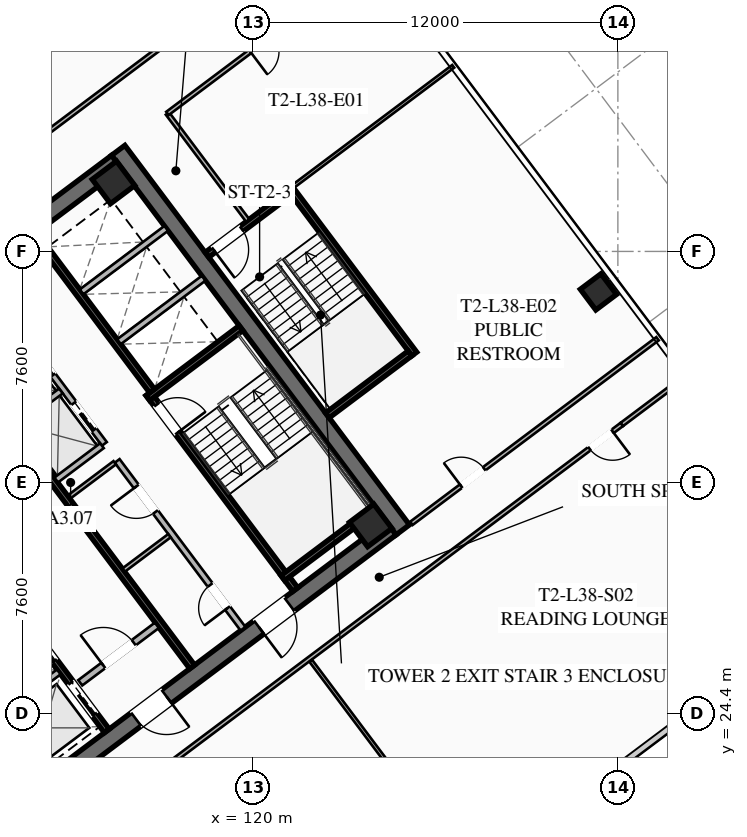
"""IFC4 building model, lengths in metres.
Left out: names, types, materials, properties, quantities, classifications, styles, units other than length and angle.
Written with IfcOpenShell. Run it as: python <this file> out.ifc"""

import sys

from ifc_helpers import new_model, si_unit, direction, frame, frame_2d, origin, origin_2d, place, context, subcontext, project, spatial, rectangle, hollow_rectangle, extrude, element, fill, save


model = new_model("IFC4")
c1 = context("Model", 3, precision=1e-05, world=origin(), true_north=direction((0.0, 1.0)))
c2 = subcontext(c1, "Body", "Model", "MODEL_VIEW")
j1 = project(units=[si_unit("LENGTHUNIT", "METRE"), si_unit("PLANEANGLEUNIT", "RADIAN")], contexts=[c1])
p1 = place(None, origin())
s1 = spatial("IfcSite", under=j1, at=p1, CompositionType="ELEMENT")
p2 = place(p1, origin())
s2 = spatial("IfcBuilding", under=s1, at=p2, CompositionType="ELEMENT")
p3 = place(p2, frame((0.0, 0.0, 142.8)))
s3 = spatial("IfcBuildingStorey", under=s2, at=p3, CompositionType="ELEMENT", Elevation=142.8)
p4 = place(p3, frame((115.564, 42.923, 0.0), z_axis=(0.0, 0.0, 1.0), x_axis=(0.600005007985, -0.799996243986, 0.0)))
e1 = element("IfcWall", 1, at=p4, inside=s3, PredefinedType="SHEAR", context=c2, shape_type="SweptSolid", body=[
    extrude(rectangle(XDim=15.6, YDim=0.55, at=frame_2d((7.8, 0.0))), origin(), (0.0, 0.0, 1.0), 3.55),
])
p5 = place(p3, frame((124.539, 30.498, 0.0), z_axis=(0.0, 0.0, 1.0), x_axis=(-0.799998054672, -0.600002593761, 0.0)))
e2 = element("IfcWall", 2, at=p5, inside=s3, PredefinedType="SHEAR", context=c2, shape_type="SweptSolid", body=[
    extrude(rectangle(XDim=15.06, YDim=0.55, at=frame_2d((7.53, 0.0))), origin(), (0.0, 0.0, 1.0), 3.55),
])
p6 = place(p5, frame((9.23, 0.0, 0.0)))
e3 = element("IfcOpeningElement", 3, at=p6, cuts=e2, PredefinedType="OPENING", context=c2, shape_type="SweptSolid", body=[
    extrude(rectangle(XDim=1.25, YDim=2.25, at=frame_2d((0.625, 1.125))), frame((0.0, 0.285, 0.0), z_axis=(0.0, -1.0, 0.0), x_axis=(1.0, 0.0, 0.0)), (0.0, 0.0, 1.0), 0.57),
])
p7 = place(p5, frame((4.18, 0.0, 0.0)))
e4 = element("IfcOpeningElement", 4, at=p7, cuts=e2, PredefinedType="OPENING", context=c2, shape_type="SweptSolid", body=[
    extrude(rectangle(XDim=1.25, YDim=2.25, at=frame_2d((0.625, 1.125))), frame((0.0, 0.285, 0.0), z_axis=(0.0, -1.0, 0.0), x_axis=(1.0, 0.0, 0.0)), (0.0, 0.0, 1.0), 0.57),
])
p8 = place(p3, frame((103.461, 33.502, 0.0), z_axis=(0.0, 0.0, 1.0), x_axis=(0.799998054672, 0.600002593761, 0.0)))
e5 = element("IfcWall", 5, at=p8, inside=s3, PredefinedType="SHEAR", context=c2, shape_type="SweptSolid", body=[
    extrude(rectangle(XDim=15.06, YDim=0.55, at=frame_2d((7.53, 0.0))), origin(), (0.0, 0.0, 1.0), 3.55),
])
p9 = place(p8, frame((4.58, 0.0, 0.0)))
e6 = element("IfcOpeningElement", 6, at=p9, cuts=e5, PredefinedType="OPENING", context=c2, shape_type="SweptSolid", body=[
    extrude(rectangle(XDim=1.25, YDim=2.25, at=frame_2d((0.625, 1.125))), frame((0.0, 0.285, 0.0), z_axis=(0.0, -1.0, 0.0), x_axis=(1.0, 0.0, 0.0)), (0.0, 0.0, 1.0), 0.57),
])
p10 = place(p8, frame((9.63, 0.0, 0.0)))
e7 = element("IfcOpeningElement", 7, at=p10, cuts=e5, PredefinedType="OPENING", context=c2, shape_type="SweptSolid", body=[
    extrude(rectangle(XDim=1.25, YDim=2.25, at=frame_2d((0.625, 1.125))), frame((0.0, 0.285, 0.0), z_axis=(0.0, -1.0, 0.0), x_axis=(1.0, 0.0, 0.0)), (0.0, 0.0, 1.0), 0.57),
])
for number, where, z_axis, x_axis in (
    (8, (123.87, 30.59, 0.0), (0.0, 0.0, 1.0), (0.8, 0.6, 0.0)),
    (9, (115.41, 41.87, 0.0), (0.0, 0.0, 1.0), (0.8, 0.6, 0.0)),
):
    element("IfcColumn", number, at=place(p3, frame(where, z_axis=z_axis, x_axis=x_axis)), inside=s3, PredefinedType="COLUMN", context=c2, shape_type="SweptSolid", body=[
        extrude(hollow_rectangle(XDim=1.0, YDim=1.0, WallThickness=0.04, at=origin_2d()), origin(), (0.0, 0.0, 1.0), 3.37),
    ])
p11 = place(p3, frame((131.36, 38.27, 0.0), z_axis=(0.0, 0.0, 1.0), x_axis=(0.799999996291, 0.600000004945, 0.0)))
e10 = element("IfcColumn", 10, at=p11, inside=s3, PredefinedType="COLUMN", context=c2, shape_type="SweptSolid", body=[
    extrude(hollow_rectangle(XDim=0.85, YDim=0.85, WallThickness=0.035, at=origin_2d()), origin(), (0.0, 0.0, 1.0), 3.37),
])
p12 = place(p3, frame((116.56, 34.92, 0.0), z_axis=(0.0, 0.0, 1.0), x_axis=(0.59999029481, -0.8000072788, 0.0)))
e11 = element("IfcWall", 11, at=p12, inside=s3, PredefinedType="SHEAR", context=c2, shape_type="SweptSolid", body=[
    extrude(rectangle(XDim=8.05, YDim=0.2, at=frame_2d((4.025, 0.0))), origin(), (0.0, 0.0, 1.0), 3.37),
])
p13 = place(p12, frame((0.45, 0.0, 0.0)))
e12 = element("IfcOpeningElement", 12, at=p13, cuts=e11, PredefinedType="OPENING", context=c2, shape_type="SweptSolid", body=[
    extrude(rectangle(XDim=1.15, YDim=2.2, at=frame_2d((0.575, 1.1))), frame((0.0, 0.11, 0.0), z_axis=(0.0, -1.0, 0.0), x_axis=(1.0, 0.0, 0.0)), (0.0, 0.0, 1.0), 0.22),
])
for number, where, z_axis, x_axis in (
    (13, (116.54, 34.78, 0.0), (0.0, 0.0, 1.0), (0.8, 0.6, 0.0)),
    (14, (120.98, 28.86, 0.0), (0.0, 0.0, 1.0), (0.8, 0.6, 0.0)),
):
    element("IfcWall", number, at=place(p3, frame(where, z_axis=z_axis, x_axis=x_axis)), inside=s3, PredefinedType="SHEAR", context=c2, shape_type="SweptSolid", body=[
        extrude(rectangle(XDim=3.83, YDim=0.2, at=frame_2d((1.915, 0.0))), origin(), (0.0, 0.0, 1.0), 3.37),
    ])
p14 = place(p3, frame((117.998, 25.936, 0.0), z_axis=(0.0, 0.0, 1.0), x_axis=(-0.600002693989, 0.799997979501, 0.0)))
e15 = element("IfcWall", 15, at=p14, inside=s3, PredefinedType="SHEAR", context=c2, shape_type="SweptSolid", body=[
    extrude(rectangle(XDim=14.5, YDim=0.2, at=frame_2d((7.25, 0.0))), origin(), (0.0, 0.0, 1.0), 3.37),
])
p15 = place(p3, frame((114.316, 25.412, 0.0), z_axis=(0.0, 0.0, 1.0), x_axis=(0.800018601094, 0.59997519774, 0.0)))
e16 = element("IfcWall", 16, at=p15, inside=s3, PredefinedType="SOLIDWALL", context=c2, shape_type="SweptSolid", body=[
    extrude(rectangle(XDim=3.15, YDim=0.22, at=frame_2d((1.575, 0.0))), origin(), (0.0, 0.0, 1.0), 2.723),
])
p16 = place(p15, frame((0.95, 0.0, 0.0)))
e17 = element("IfcOpeningElement", 17, at=p16, cuts=e16, PredefinedType="OPENING", context=c2, shape_type="SweptSolid", body=[
    extrude(rectangle(XDim=1.25, YDim=2.25, at=frame_2d((0.625, 1.125))), frame((0.0, 0.12, 0.0), z_axis=(0.0, -1.0, 0.0), x_axis=(1.0, 0.0, 0.0)), (0.0, 0.0, 1.0), 0.24),
])
p17 = place(p3, frame((115.19, 23.83, 0.0), z_axis=(0.0, 0.0, 1.0), x_axis=(-0.599993943644, 0.800004542231, 0.0)))
e18 = element("IfcWall", 18, at=p17, inside=s3, PredefinedType="SHEAR", context=c2, shape_type="SweptSolid", body=[
    extrude(rectangle(XDim=6.45, YDim=0.2, at=frame_2d((3.225, 0.0))), origin(), (0.0, 0.0, 1.0), 3.37),
])
p18 = place(p17, frame((4.875, 0.0, 0.0)))
e19 = element("IfcOpeningElement", 19, at=p18, cuts=e18, PredefinedType="OPENING", context=c2, shape_type="SweptSolid", body=[
    extrude(rectangle(XDim=1.3, YDim=2.25, at=frame_2d((0.65, 1.125))), frame((0.0, 0.11, 0.0), z_axis=(0.0, -1.0, 0.0), x_axis=(1.0, 0.0, 0.0)), (0.0, 0.0, 1.0), 0.22),
])
p19 = place(p17, frame((2.875, 0.0, 0.0)))
e20 = element("IfcOpeningElement", 20, at=p19, cuts=e18, PredefinedType="OPENING", context=c2, shape_type="SweptSolid", body=[
    extrude(rectangle(XDim=1.3, YDim=2.25, at=frame_2d((0.65, 1.125))), frame((0.0, 0.11, 0.0), z_axis=(0.0, -1.0, 0.0), x_axis=(1.0, 0.0, 0.0)), (0.0, 0.0, 1.0), 0.22),
])
p20 = place(p17, frame((0.675, 0.0, 0.0)))
e21 = element("IfcOpeningElement", 21, at=p20, cuts=e18, PredefinedType="OPENING", context=c2, shape_type="SweptSolid", body=[
    extrude(rectangle(XDim=1.3, YDim=2.25, at=frame_2d((0.65, 1.125))), frame((0.0, 0.11, 0.0), z_axis=(0.0, -1.0, 0.0), x_axis=(1.0, 0.0, 0.0)), (0.0, 0.0, 1.0), 0.22),
])
p21 = place(p3, frame((110.826, 23.682, 0.0), z_axis=(0.0, 0.0, 1.0), x_axis=(0.8, 0.6, 0.0)))
e22 = element("IfcWall", 22, at=p21, inside=s3, PredefinedType="SOLIDWALL", context=c2, shape_type="SweptSolid", body=[
    extrude(rectangle(XDim=3.48, YDim=0.2, at=frame_2d((1.74, 0.0))), origin(), (0.0, 0.0, 1.0), 3.37),
])
p22 = place(p3, frame((112.81, 40.17, 0.0), z_axis=(0.0, 0.0, 1.0), x_axis=(0.599993943644, -0.800004542231, 0.0)))
e23 = element("IfcWall", 23, at=p22, inside=s3, PredefinedType="SHEAR", context=c2, shape_type="SweptSolid", body=[
    extrude(rectangle(XDim=6.45, YDim=0.2, at=frame_2d((3.225, 0.0))), origin(), (0.0, 0.0, 1.0), 3.37),
])
for number, where, z_axis, x_axis in (
    (24, (115.59, 36.63, 0.0), (0.0, 0.0, 1.0), (0.8, 0.6, 0.0)),
    (25, (114.36, 38.27, 0.0), (0.0, 0.0, 1.0), (0.8, 0.6, 0.0)),
):
    element("IfcWall", number, at=place(p3, frame(where, z_axis=z_axis, x_axis=x_axis)), inside=s3, PredefinedType="SOLIDWALL", context=c2, shape_type="SweptSolid", body=[
        extrude(rectangle(XDim=3.48, YDim=0.2, at=frame_2d((1.74, 0.0))), origin(), (0.0, 0.0, 1.0), 3.37),
    ])
p23 = place(p3, frame((119.67, 27.19, 0.0), z_axis=(0.0, 0.0, 1.0), x_axis=(-0.599988677396, 0.800008491828, 0.0)))
e26 = element("IfcWall", 26, at=p23, inside=s3, PredefinedType="SOLIDWALL", context=c2, shape_type="SweptSolid", body=[
    extrude(rectangle(XDim=6.9, YDim=0.2, at=frame_2d((3.45, 0.0))), origin(), (0.0, 0.0, 1.0), 2.723),
])
p24 = place(p23, frame((0.85, 0.0, 0.0)))
e27 = element("IfcOpeningElement", 27, at=p24, cuts=e26, PredefinedType="OPENING", context=c2, shape_type="SweptSolid", body=[
    extrude(rectangle(XDim=0.95, YDim=2.05, at=frame_2d((0.475, 1.025))), frame((0.0, 0.11, 0.0), z_axis=(0.0, -1.0, 0.0), x_axis=(1.0, 0.0, 0.0)), (0.0, 0.0, 1.0), 0.22),
])
p25 = place(p23, frame((4.8, 0.0, 0.0)))
e28 = element("IfcOpeningElement", 28, at=p25, cuts=e26, PredefinedType="OPENING", context=c2, shape_type="SweptSolid", body=[
    extrude(rectangle(XDim=1.05, YDim=2.2, at=frame_2d((0.525, 1.1))), frame((0.0, 0.11, 0.0), z_axis=(0.0, -1.0, 0.0), x_axis=(1.0, 0.0, 0.0)), (0.0, 0.0, 1.0), 0.22),
])
for number, where, z_axis, x_axis in (
    (29, (113.946, 31.522, 0.0), (0.0, 0.0, 1.0), (0.8, 0.6, 0.0)),
    (30, (115.746, 29.122, 0.0), (0.0, 0.0, 1.0), (0.8, 0.6, 0.0)),
):
    element("IfcWall", number, at=place(p3, frame(where, z_axis=z_axis, x_axis=x_axis)), inside=s3, PredefinedType="PARTITIONING", context=c2, shape_type="SweptSolid", body=[
        extrude(rectangle(XDim=1.88, YDim=0.135, at=frame_2d((0.94, 0.0))), origin(), (0.0, 0.0, 1.0), 2.723),
    ])
p26 = place(p3, frame((115.11, 33.27, 0.0), z_axis=(0.0, 0.0, 1.0), x_axis=(-0.600011322243, 0.799991508192, 0.0)))
e31 = element("IfcWall", 31, at=p26, inside=s3, PredefinedType="SOLIDWALL", context=c2, shape_type="SweptSolid", body=[
    extrude(rectangle(XDim=6.9, YDim=0.2, at=frame_2d((3.45, 0.0))), origin(), (0.0, 0.0, 1.0), 3.37),
])
p27 = place(p26, frame((0.575, 0.0, 0.0)))
e32 = element("IfcOpeningElement", 32, at=p27, cuts=e31, PredefinedType="OPENING", context=c2, shape_type="SweptSolid", body=[
    extrude(rectangle(XDim=1.1, YDim=2.2, at=frame_2d((0.55, 1.1))), frame((0.0, 0.11, 0.0), z_axis=(0.0, -1.0, 0.0), x_axis=(1.0, 0.0, 0.0)), (0.0, 0.0, 1.0), 0.22),
])
p28 = place(p26, frame((2.825, 0.0, 0.0)))
e33 = element("IfcOpeningElement", 33, at=p28, cuts=e31, PredefinedType="OPENING", context=c2, shape_type="SweptSolid", body=[
    extrude(rectangle(XDim=1.1, YDim=2.2, at=frame_2d((0.55, 1.1))), frame((0.0, 0.11, 0.0), z_axis=(0.0, -1.0, 0.0), x_axis=(1.0, 0.0, 0.0)), (0.0, 0.0, 1.0), 0.22),
])
p29 = place(p26, frame((5.075, 0.0, 0.0)))
e34 = element("IfcOpeningElement", 34, at=p29, cuts=e31, PredefinedType="OPENING", context=c2, shape_type="SweptSolid", body=[
    extrude(rectangle(XDim=1.1, YDim=2.2, at=frame_2d((0.55, 1.1))), frame((0.0, 0.11, 0.0), z_axis=(0.0, -1.0, 0.0), x_axis=(1.0, 0.0, 0.0)), (0.0, 0.0, 1.0), 0.22),
])
p30 = place(p3, frame((113.526, 32.082, 0.0), z_axis=(0.0, 0.0, 1.0), x_axis=(0.800046745961, 0.599937666993, 0.0)))
e35 = element("IfcWall", 35, at=p30, inside=s3, PredefinedType="SOLIDWALL", context=c2, shape_type="SweptSolid", body=[
    extrude(rectangle(XDim=1.88, YDim=0.2, at=frame_2d((0.94, 0.0))), origin(), (0.0, 0.0, 1.0), 3.37),
])
p31 = place(p3, frame((112.176, 33.882, 0.0), z_axis=(0.0, 0.0, 1.0), x_axis=(0.8, 0.6, 0.0)))
e36 = element("IfcWall", 36, at=p31, inside=s3, PredefinedType="SOLIDWALL", context=c2, shape_type="SweptSolid", body=[
    extrude(rectangle(XDim=1.88, YDim=0.2, at=frame_2d((0.94, 0.0))), origin(), (0.0, 0.0, 1.0), 3.37),
])
p32 = place(p3, frame((125.304, 36.228, 0.0), z_axis=(0.0, 0.0, 1.0), x_axis=(-0.59998851072, 0.800008616831, 0.0)))
e37 = element("IfcWall", 37, at=p32, inside=s3, PredefinedType="SHEAR", context=c2, shape_type="SweptSolid", body=[
    extrude(rectangle(XDim=6.8, YDim=0.2, at=frame_2d((3.4, 0.0))), origin(), (0.0, 0.0, 1.0), 3.37),
])
p33 = place(p3, frame((121.204, 41.528, 0.0), z_axis=(0.0, 0.0, 1.0), x_axis=(-0.800017232136, -0.599977023131, 0.0)))
e38 = element("IfcWall", 38, at=p33, inside=s3, PredefinedType="SHEAR", context=c2, shape_type="SweptSolid", body=[
    extrude(rectangle(XDim=3.4, YDim=0.2, at=frame_2d((1.7, 0.0))), origin(), (0.0, 0.0, 1.0), 3.37),
])
p34 = place(p33, frame((1.975, 0.0, 0.0)))
e39 = element("IfcOpeningElement", 39, at=p34, cuts=e38, PredefinedType="OPENING", context=c2, shape_type="SweptSolid", body=[
    extrude(rectangle(XDim=1.15, YDim=2.2, at=frame_2d((0.575, 1.1))), frame((0.0, 0.11, 0.0), z_axis=(0.0, -1.0, 0.0), x_axis=(1.0, 0.0, 0.0)), (0.0, 0.0, 1.0), 0.22),
])
p35 = place(p3, frame((122.444, 34.208, 0.0), z_axis=(0.0, 0.0, 1.0), x_axis=(0.79999138319, 0.600011488909, 0.0)))
e40 = element("IfcWall", 40, at=p35, inside=s3, PredefinedType="SHEAR", context=c2, shape_type="SweptSolid", body=[
    extrude(rectangle(XDim=3.4, YDim=0.2, at=frame_2d((1.7, 0.0))), origin(), (0.0, 0.0, 1.0), 3.37),
])
p36 = place(p3, frame((119.824, 40.618, 0.0), z_axis=(0.0, 0.0, 1.0), x_axis=(-0.599982243973, 0.800013316712, 0.0)))
e41 = element("IfcWall", 41, at=p36, inside=s3, PredefinedType="PARTITIONING", context=c2, shape_type="SweptSolid", body=[
    extrude(rectangle(XDim=4.4, YDim=0.135, at=frame_2d((2.2, 0.0))), origin(), (0.0, 0.0, 1.0), 2.723),
])
p37 = place(p3, frame((95.678, 30.346, 0.0), z_axis=(0.0, 0.0, 1.0), x_axis=(0.8, 0.6, 0.0)))
e42 = element("IfcWall", 42, at=p37, inside=s3, PredefinedType="PARTITIONING", context=c2, shape_type="SweptSolid", body=[
    extrude(rectangle(XDim=31.3, YDim=0.135, at=frame_2d((15.65, 0.0))), origin(), (0.0, 0.0, 1.0), 2.723),
])
p38 = place(p37, frame((0.3, 0.0, 0.0)))
e43 = element("IfcOpeningElement", 43, at=p38, cuts=e42, PredefinedType="OPENING", context=c2, shape_type="SweptSolid", body=[
    extrude(rectangle(XDim=0.95, YDim=2.05, at=frame_2d((0.475, 1.025))), frame((0.0, 0.077, 0.0), z_axis=(0.0, -1.0, 0.0), x_axis=(1.0, 0.0, 0.0)), (0.0, 0.0, 1.0), 0.155),
])
p39 = place(p37, frame((30.05, 0.0, 0.0)))
e44 = element("IfcOpeningElement", 44, at=p39, cuts=e42, PredefinedType="OPENING", context=c2, shape_type="SweptSolid", body=[
    extrude(rectangle(XDim=0.95, YDim=2.05, at=frame_2d((0.475, 1.025))), frame((0.0, 0.077, 0.0), z_axis=(0.0, -1.0, 0.0), x_axis=(1.0, 0.0, 0.0)), (0.0, 0.0, 1.0), 0.155),
])
p40 = place(p3, frame((132.13, 33.91, 0.0), z_axis=(0.0, 0.0, 1.0), x_axis=(-0.799997191971, -0.600003744021, 0.0)))
e45 = element("IfcWall", 45, at=p40, inside=s3, PredefinedType="PARTITIONING", context=c2, shape_type="SweptSolid", body=[
    extrude(rectangle(XDim=31.3, YDim=0.135, at=frame_2d((15.65, 0.0))), origin(), (0.0, 0.0, 1.0), 2.723),
])
p41 = place(p40, frame((29.97, 0.0, 0.0)))
e46 = element("IfcOpeningElement", 46, at=p41, cuts=e45, PredefinedType="OPENING", context=c2, shape_type="SweptSolid", body=[
    extrude(rectangle(XDim=0.95, YDim=2.05, at=frame_2d((0.475, 1.025))), frame((0.0, 0.077, 0.0), z_axis=(0.0, -1.0, 0.0), x_axis=(1.0, 0.0, 0.0)), (0.0, 0.0, 1.0), 0.155),
])
p42 = place(p40, frame((0.38, 0.0, 0.0)))
e47 = element("IfcOpeningElement", 47, at=p42, cuts=e45, PredefinedType="OPENING", context=c2, shape_type="SweptSolid", body=[
    extrude(rectangle(XDim=0.95, YDim=2.05, at=frame_2d((0.475, 1.025))), frame((0.0, 0.077, 0.0), z_axis=(0.0, -1.0, 0.0), x_axis=(1.0, 0.0, 0.0)), (0.0, 0.0, 1.0), 0.155),
])
p43 = place(p3, frame((132.13, 33.91, 0.0), z_axis=(0.0, 0.0, 1.0), x_axis=(0.799977721118, 0.600029704027, 0.0)))
e48 = element("IfcWall", 48, at=p43, inside=s3, PredefinedType="PARTITIONING", context=c2, shape_type="SweptSolid", body=[
    extrude(rectangle(XDim=2.63, YDim=0.135, at=frame_2d((1.315, 0.0))), origin(), (0.0, 0.0, 1.0), 2.723),
])
p44 = place(p3, frame((127.208, 19.056, 0.0), z_axis=(0.0, 0.0, 1.0), x_axis=(-0.6, 0.8, 0.0)))
e49 = element("IfcWall", 49, at=p44, inside=s3, PredefinedType="PARTITIONING", context=c2, shape_type="SweptSolid", body=[
    extrude(rectangle(XDim=8.85, YDim=0.11, at=frame_2d((4.425, 0.0))), origin(), (0.0, 0.0, 1.0), 2.723),
])
p45 = place(p3, frame((123.944, 49.208, 0.0), z_axis=(0.0, 0.0, 1.0), x_axis=(-0.799996532921, -0.600004622744, 0.0)))
e50 = element("IfcWall", 50, at=p45, inside=s3, PredefinedType="PARTITIONING", context=c2, shape_type="SweptSolid", body=[
    extrude(rectangle(XDim=8.45, YDim=0.135, at=frame_2d((4.225, 0.0))), origin(), (0.0, 0.0, 1.0), 2.723),
])
p46 = place(p45, frame((4.1, 0.0, 0.0)))
e51 = element("IfcOpeningElement", 51, at=p46, cuts=e50, PredefinedType="OPENING", context=c2, shape_type="SweptSolid", body=[
    extrude(rectangle(XDim=0.95, YDim=2.05, at=frame_2d((0.475, 1.025))), frame((0.0, 0.077, 0.0), z_axis=(0.0, -1.0, 0.0), x_axis=(1.0, 0.0, 0.0)), (0.0, 0.0, 1.0), 0.155),
])
p47 = place(p3, frame((125.208, 30.656, 0.0), z_axis=(0.0, 0.0, 1.0), x_axis=(0.799997105034, 0.600003859935, 0.0)))
e52 = element("IfcWall", 52, at=p47, inside=s3, PredefinedType="PARTITIONING", context=c2, shape_type="SweptSolid", body=[
    extrude(rectangle(XDim=10.12, YDim=0.135, at=frame_2d((5.06, 0.0))), origin(), (0.0, 0.0, 1.0), 2.723),
])
p48 = place(p47, frame((2.045, 0.0, 0.0)))
e53 = element("IfcOpeningElement", 53, at=p48, cuts=e52, PredefinedType="OPENING", context=c2, shape_type="SweptSolid", body=[
    extrude(rectangle(XDim=0.95, YDim=2.05, at=frame_2d((0.475, 1.025))), frame((0.0, 0.077, 0.0), z_axis=(0.0, -1.0, 0.0), x_axis=(1.0, 0.0, 0.0)), (0.0, 0.0, 1.0), 0.155),
])
p49 = place(p3, frame((126.584, 45.688, 0.0), z_axis=(0.0, 0.0, 1.0), x_axis=(-0.800004438899, -0.599994081423, 0.0)))
e54 = element("IfcWall", 54, at=p49, inside=s3, PredefinedType="PARTITIONING", context=c2, shape_type="SweptSolid", body=[
    extrude(rectangle(XDim=6.6, YDim=0.11, at=frame_2d((3.3, 0.0))), origin(), (0.0, 0.0, 1.0), 2.723),
])
p50 = place(p6, origin())
e55 = element("IfcDoor", 55, at=p50, inside=s3, OperationType="SINGLE_SWING_LEFT", PredefinedType="DOOR", context=c2, shape_type="SweptSolid", body=[
    extrude(rectangle(XDim=1.25, YDim=2.25, at=frame_2d((0.625, 1.125))), frame((0.0, 0.025, 0.0), z_axis=(0.0, -1.0, 0.0), x_axis=(1.0, 0.0, 0.0)), (0.0, 0.0, 1.0), 0.05),
])
fill(e3, e55)
p51 = place(p7, origin())
e56 = element("IfcDoor", 56, at=p51, inside=s3, OperationType="SINGLE_SWING_RIGHT", PredefinedType="DOOR", context=c2, shape_type="SweptSolid", body=[
    extrude(rectangle(XDim=1.25, YDim=2.25, at=frame_2d((0.625, 1.125))), frame((0.0, 0.025, 0.0), z_axis=(0.0, -1.0, 0.0), x_axis=(1.0, 0.0, 0.0)), (0.0, 0.0, 1.0), 0.05),
])
fill(e4, e56)
p52 = place(p13, origin())
e57 = element("IfcDoor", 57, at=p52, inside=s3, OperationType="SINGLE_SWING_RIGHT", PredefinedType="DOOR", context=c2, shape_type="SweptSolid", body=[
    extrude(rectangle(XDim=1.15, YDim=2.2, at=frame_2d((0.575, 1.1))), frame((0.0, 0.025, 0.0), z_axis=(0.0, -1.0, 0.0), x_axis=(1.0, 0.0, 0.0)), (0.0, 0.0, 1.0), 0.05),
])
fill(e12, e57)
p53 = place(p16, origin())
e58 = element("IfcDoor", 58, at=p53, inside=s3, OperationType="SINGLE_SWING_LEFT", PredefinedType="DOOR", context=c2, shape_type="SweptSolid", body=[
    extrude(rectangle(XDim=1.25, YDim=2.25, at=frame_2d((0.625, 1.125))), frame((0.0, 0.025, 0.0), z_axis=(0.0, -1.0, 0.0), x_axis=(1.0, 0.0, 0.0)), (0.0, 0.0, 1.0), 0.05),
])
fill(e17, e58)
p54 = place(p24, origin())
e59 = element("IfcDoor", 59, at=p54, inside=s3, OperationType="SINGLE_SWING_LEFT", PredefinedType="DOOR", context=c2, shape_type="SweptSolid", body=[
    extrude(rectangle(XDim=0.95, YDim=2.05, at=frame_2d((0.475, 1.025))), frame((0.0, 0.025, 0.0), z_axis=(0.0, -1.0, 0.0), x_axis=(1.0, 0.0, 0.0)), (0.0, 0.0, 1.0), 0.05),
])
fill(e27, e59)
p55 = place(p25, origin())
e60 = element("IfcDoor", 60, at=p55, inside=s3, OperationType="SINGLE_SWING_RIGHT", PredefinedType="DOOR", context=c2, shape_type="SweptSolid", body=[
    extrude(rectangle(XDim=1.05, YDim=2.2, at=frame_2d((0.525, 1.1))), frame((0.0, 0.025, 0.0), z_axis=(0.0, -1.0, 0.0), x_axis=(1.0, 0.0, 0.0)), (0.0, 0.0, 1.0), 0.05),
])
fill(e28, e60)
p56 = place(p34, origin())
e61 = element("IfcDoor", 61, at=p56, inside=s3, OperationType="SINGLE_SWING_RIGHT", PredefinedType="DOOR", context=c2, shape_type="SweptSolid", body=[
    extrude(rectangle(XDim=1.15, YDim=2.2, at=frame_2d((0.575, 1.1))), frame((0.0, 0.025, 0.0), z_axis=(0.0, -1.0, 0.0), x_axis=(1.0, 0.0, 0.0)), (0.0, 0.0, 1.0), 0.05),
])
fill(e39, e61)
p57 = place(p42, origin())
e62 = element("IfcDoor", 62, at=p57, inside=s3, OperationType="SINGLE_SWING_LEFT", PredefinedType="DOOR", context=c2, shape_type="SweptSolid", body=[
    extrude(rectangle(XDim=0.95, YDim=2.05, at=frame_2d((0.475, 1.025))), frame((0.0, 0.025, 0.0), z_axis=(0.0, -1.0, 0.0), x_axis=(1.0, 0.0, 0.0)), (0.0, 0.0, 1.0), 0.05),
])
fill(e47, e62)
p58 = place(p48, origin())
e63 = element("IfcDoor", 63, at=p58, inside=s3, OperationType="SINGLE_SWING_LEFT", PredefinedType="DOOR", context=c2, shape_type="SweptSolid", body=[
    extrude(rectangle(XDim=0.95, YDim=2.05, at=frame_2d((0.475, 1.025))), frame((0.0, 0.025, 0.0), z_axis=(0.0, -1.0, 0.0), x_axis=(1.0, 0.0, 0.0)), (0.0, 0.0, 1.0), 0.05),
])
fill(e53, e63)
p59 = place(p19, origin())
e64 = element("IfcDoor", 64, at=p59, inside=s3, OperationType="SLIDING_TO_LEFT", PredefinedType="DOOR", context=c2, shape_type="SweptSolid", body=[
    extrude(rectangle(XDim=1.3, YDim=2.25, at=frame_2d((0.65, 1.125))), frame((0.0, 0.025, 0.0), z_axis=(0.0, -1.0, 0.0), x_axis=(1.0, 0.0, 0.0)), (0.0, 0.0, 1.0), 0.05),
])
fill(e20, e64)
p60 = place(p20, origin())
e65 = element("IfcDoor", 65, at=p60, inside=s3, OperationType="SLIDING_TO_LEFT", PredefinedType="DOOR", context=c2, shape_type="SweptSolid", body=[
    extrude(rectangle(XDim=1.3, YDim=2.25, at=frame_2d((0.65, 1.125))), frame((0.0, 0.025, 0.0), z_axis=(0.0, -1.0, 0.0), x_axis=(1.0, 0.0, 0.0)), (0.0, 0.0, 1.0), 0.05),
])
fill(e21, e65)
p61 = place(p27, origin())
e66 = element("IfcDoor", 66, at=p61, inside=s3, OperationType="SLIDING_TO_LEFT", PredefinedType="DOOR", context=c2, shape_type="SweptSolid", body=[
    extrude(rectangle(XDim=1.1, YDim=2.2, at=frame_2d((0.55, 1.1))), frame((0.0, 0.025, 0.0), z_axis=(0.0, -1.0, 0.0), x_axis=(1.0, 0.0, 0.0)), (0.0, 0.0, 1.0), 0.05),
])
fill(e32, e66)
p62 = place(p28, origin())
e67 = element("IfcDoor", 67, at=p62, inside=s3, OperationType="SLIDING_TO_LEFT", PredefinedType="DOOR", context=c2, shape_type="SweptSolid", body=[
    extrude(rectangle(XDim=1.1, YDim=2.2, at=frame_2d((0.55, 1.1))), frame((0.0, 0.025, 0.0), z_axis=(0.0, -1.0, 0.0), x_axis=(1.0, 0.0, 0.0)), (0.0, 0.0, 1.0), 0.05),
])
fill(e33, e67)
save(model, sys.argv[1])
